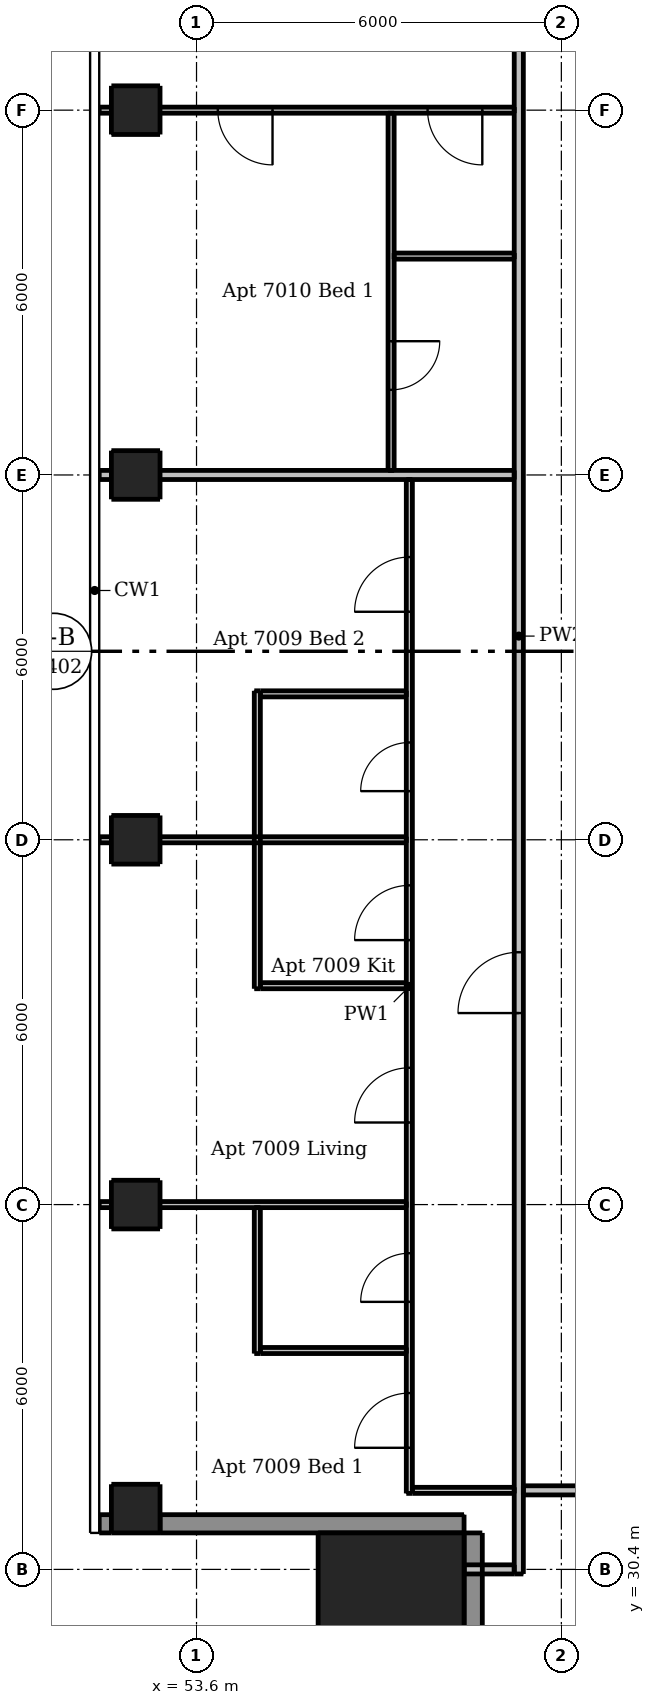
"""IFC4 building model, lengths in metres.
Left out: names, types, materials, properties, quantities, classifications, styles, units other than length and angle.
Written with IfcOpenShell. Run it as: python <this file> out.ifc"""

import sys

from ifc_helpers import new_model, si_unit, direction, frame, frame_2d, origin, origin_2d, place, context, subcontext, project, spatial, rectangle, extrude, element, fill, save


model = new_model("IFC4")
c1 = context("Model", 3, precision=1e-05, world=origin(), true_north=direction((0.0, 1.0)))
c2 = subcontext(c1, "Body", "Model", "MODEL_VIEW")
j1 = project(units=[si_unit("LENGTHUNIT", "METRE"), si_unit("PLANEANGLEUNIT", "RADIAN")], contexts=[c1])
p1 = place(None, origin())
s1 = spatial("IfcSite", under=j1, at=p1, CompositionType="ELEMENT")
p2 = place(p1, origin())
s2 = spatial("IfcBuilding", under=s1, at=p2, CompositionType="ELEMENT")
p3 = place(p2, frame((0.0, 0.0, 262.0)))
s3 = spatial("IfcBuildingStorey", under=s2, at=p3, CompositionType="ELEMENT", Elevation=262.0)
for number, where, z_axis, x_axis in (
    (1, (52.6, 31.4, 0.0), (0.0, 0.0, 1.0), (1.0, 0.0, 0.0)),
    (2, (52.6, 36.4, 0.0), (0.0, 0.0, 1.0), (1.0, 0.0, 0.0)),
    (3, (52.6, 42.4, 0.0), (0.0, 0.0, 1.0), (1.0, 0.0, 0.0)),
    (4, (52.6, 48.4, 0.0), (0.0, 0.0, 1.0), (1.0, 0.0, 0.0)),
    (5, (52.6, 54.4, 0.0), (0.0, 0.0, 1.0), (1.0, 0.0, 0.0)),
):
    element("IfcColumn", number, at=place(p3, frame(where, z_axis=z_axis, x_axis=x_axis)), inside=s3, PredefinedType="COLUMN", context=c2, shape_type="SweptSolid", body=[
        extrude(rectangle(XDim=0.8, YDim=0.8, at=origin_2d()), origin(), (0.0, 0.0, 1.0), 3.05),
    ])
p4 = place(p3, frame((56.8, 29.8, 0.0), z_axis=(0.0, 0.0, 1.0), x_axis=(1.0, 0.0, 0.0)))
e6 = element("IfcColumn", 6, at=p4, inside=s3, PredefinedType="COLUMN", context=c2, shape_type="SweptSolid", body=[
    extrude(rectangle(XDim=2.4, YDim=2.4, at=origin_2d()), origin(), (0.0, 0.0, 1.0), 3.3),
])
p5 = place(p3, frame((52.0, 31.15, 0.0), z_axis=(0.0, 0.0, 1.0), x_axis=(1.0, 0.0, 0.0)))
e7 = element("IfcWall", 7, at=p5, inside=s3, PredefinedType="SOLIDWALL", context=c2, shape_type="SweptSolid", body=[
    extrude(rectangle(XDim=0.2, YDim=0.3, at=frame_2d((0.1, 0.0))), origin(), (0.0, 0.0, 1.0), 3.05),
])
p6 = place(p3, frame((53.0, 31.15, 0.0), z_axis=(0.0, 0.0, 1.0), x_axis=(1.0, 0.0, 0.0)))
e8 = element("IfcWall", 8, at=p6, inside=s3, PredefinedType="SOLIDWALL", context=c2, shape_type="SweptSolid", body=[
    extrude(rectangle(XDim=5.0, YDim=0.3, at=frame_2d((2.5, 0.0))), origin(), (0.0, 0.0, 1.0), 3.05),
])
p7 = place(p3, frame((58.15, 31.0, 0.0), z_axis=(0.0, 0.0, 1.0), x_axis=(0.0, -1.0, 0.0)))
e9 = element("IfcWall", 9, at=p7, inside=s3, PredefinedType="SOLIDWALL", context=c2, shape_type="SweptSolid", body=[
    extrude(rectangle(XDim=6.0, YDim=0.3, at=frame_2d((3.0, 0.0))), origin(), (0.0, 0.0, 1.0), 3.05),
])
p8 = place(p7, frame((1.8, 0.0, 0.15)))
e10 = element("IfcOpeningElement", 10, at=p8, cuts=e9, PredefinedType="OPENING", context=c2, shape_type="SweptSolid", body=[
    extrude(rectangle(XDim=2.4, YDim=2.1, at=frame_2d((1.2, 1.05))), frame((0.0, 0.16, 0.0), z_axis=(0.0, -1.0, 0.0), x_axis=(1.0, 0.0, 0.0)), (0.0, 0.0, 1.0), 0.32),
])
p9 = place(p3, frame((54.6, 33.95, 0.0), z_axis=(0.0, 0.0, 1.0), x_axis=(0.0, 1.0, 0.0)))
e11 = element("IfcWall", 11, at=p9, inside=s3, PredefinedType="PARTITIONING", context=c2, shape_type="SweptSolid", body=[
    extrude(rectangle(XDim=2.4, YDim=0.1, at=frame_2d((1.2, 0.0))), origin(), (0.0, 0.0, 1.0), 3.05),
])
p10 = place(p3, frame((54.6, 39.95, 0.0), z_axis=(0.0, 0.0, 1.0), x_axis=(0.0, 1.0, 0.0)))
e12 = element("IfcWall", 12, at=p10, inside=s3, PredefinedType="PARTITIONING", context=c2, shape_type="SweptSolid", body=[
    extrude(rectangle(XDim=4.9, YDim=0.1, at=frame_2d((2.45, 0.0))), origin(), (0.0, 0.0, 1.0), 3.05),
])
p11 = place(p3, frame((56.8, 54.35, 0.0), z_axis=(0.0, 0.0, 1.0), x_axis=(0.0, -1.0, 0.0)))
e13 = element("IfcWall", 13, at=p11, inside=s3, PredefinedType="PARTITIONING", context=c2, shape_type="SweptSolid", body=[
    extrude(rectangle(XDim=5.875, YDim=0.1, at=frame_2d((2.938, 0.0))), origin(), (0.0, 0.0, 1.0), 3.05),
])
p12 = place(p11, frame((3.75, 0.0, 0.0)))
e14 = element("IfcOpeningElement", 14, at=p12, cuts=e13, PredefinedType="OPENING", context=c2, shape_type="SweptSolid", body=[
    extrude(rectangle(XDim=0.8, YDim=2.1, at=frame_2d((0.4, 1.05))), frame((0.0, 0.06, 0.0), z_axis=(0.0, -1.0, 0.0), x_axis=(1.0, 0.0, 0.0)), (0.0, 0.0, 1.0), 0.12),
])
p13 = place(p3, frame((57.1, 31.65, 0.0), z_axis=(0.0, 0.0, 1.0), x_axis=(0.0, 1.0, 0.0)))
e15 = element("IfcWall", 15, at=p13, inside=s3, PredefinedType="PARTITIONING", context=c2, shape_type="SweptSolid", body=[
    extrude(rectangle(XDim=16.675, YDim=0.1, at=frame_2d((8.337, 0.0))), origin(), (0.0, 0.0, 1.0), 3.05),
])
p14 = place(p13, frame((6.1, 0.0, 0.0)))
e16 = element("IfcOpeningElement", 16, at=p14, cuts=e15, PredefinedType="OPENING", context=c2, shape_type="SweptSolid", body=[
    extrude(rectangle(XDim=0.9, YDim=2.1, at=frame_2d((0.45, 1.05))), frame((0.0, 0.06, 0.0), z_axis=(0.0, -1.0, 0.0), x_axis=(1.0, 0.0, 0.0)), (0.0, 0.0, 1.0), 0.12),
])
p15 = place(p13, frame((9.1, 0.0, 0.0)))
e17 = element("IfcOpeningElement", 17, at=p15, cuts=e15, PredefinedType="OPENING", context=c2, shape_type="SweptSolid", body=[
    extrude(rectangle(XDim=0.9, YDim=2.1, at=frame_2d((0.45, 1.05))), frame((0.0, 0.06, 0.0), z_axis=(0.0, -1.0, 0.0), x_axis=(1.0, 0.0, 0.0)), (0.0, 0.0, 1.0), 0.12),
])
p16 = place(p13, frame((0.75, 0.0, 0.0)))
e18 = element("IfcOpeningElement", 18, at=p16, cuts=e15, PredefinedType="OPENING", context=c2, shape_type="SweptSolid", body=[
    extrude(rectangle(XDim=0.9, YDim=2.1, at=frame_2d((0.45, 1.05))), frame((0.0, 0.06, 0.0), z_axis=(0.0, -1.0, 0.0), x_axis=(1.0, 0.0, 0.0)), (0.0, 0.0, 1.0), 0.12),
])
p17 = place(p13, frame((14.5, 0.0, 0.0)))
e19 = element("IfcOpeningElement", 19, at=p17, cuts=e15, PredefinedType="OPENING", context=c2, shape_type="SweptSolid", body=[
    extrude(rectangle(XDim=0.9, YDim=2.1, at=frame_2d((0.45, 1.05))), frame((0.0, 0.06, 0.0), z_axis=(0.0, -1.0, 0.0), x_axis=(1.0, 0.0, 0.0)), (0.0, 0.0, 1.0), 0.12),
])
p18 = place(p13, frame((3.15, 0.0, 0.0)))
e20 = element("IfcOpeningElement", 20, at=p18, cuts=e15, PredefinedType="OPENING", context=c2, shape_type="SweptSolid", body=[
    extrude(rectangle(XDim=0.8, YDim=2.1, at=frame_2d((0.4, 1.05))), frame((0.0, 0.06, 0.0), z_axis=(0.0, -1.0, 0.0), x_axis=(1.0, 0.0, 0.0)), (0.0, 0.0, 1.0), 0.12),
])
p19 = place(p13, frame((11.55, 0.0, 0.0)))
e21 = element("IfcOpeningElement", 21, at=p19, cuts=e15, PredefinedType="OPENING", context=c2, shape_type="SweptSolid", body=[
    extrude(rectangle(XDim=0.8, YDim=2.1, at=frame_2d((0.4, 1.05))), frame((0.0, 0.06, 0.0), z_axis=(0.0, -1.0, 0.0), x_axis=(1.0, 0.0, 0.0)), (0.0, 0.0, 1.0), 0.12),
])
p20 = place(p3, frame((58.825, 54.4, 0.0), z_axis=(0.0, 0.0, 1.0), x_axis=(-1.0, 0.0, 0.0)))
e22 = element("IfcWall", 22, at=p20, inside=s3, PredefinedType="PARTITIONING", context=c2, shape_type="SweptSolid", body=[
    extrude(rectangle(XDim=6.825, YDim=0.1, at=frame_2d((3.413, 0.0))), origin(), (0.0, 0.0, 1.0), 2.516),
])
p21 = place(p20, frame((0.525, 0.0, 0.0)))
e23 = element("IfcOpeningElement", 23, at=p21, cuts=e22, PredefinedType="OPENING", context=c2, shape_type="SweptSolid", body=[
    extrude(rectangle(XDim=0.9, YDim=2.1, at=frame_2d((0.45, 1.05))), frame((0.0, 0.06, 0.0), z_axis=(0.0, -1.0, 0.0), x_axis=(1.0, 0.0, 0.0)), (0.0, 0.0, 1.0), 0.12),
])
p22 = place(p20, frame((3.975, 0.0, 0.0)))
e24 = element("IfcOpeningElement", 24, at=p22, cuts=e22, PredefinedType="OPENING", context=c2, shape_type="SweptSolid", body=[
    extrude(rectangle(XDim=0.9, YDim=2.1, at=frame_2d((0.45, 1.05))), frame((0.0, 0.06, 0.0), z_axis=(0.0, -1.0, 0.0), x_axis=(1.0, 0.0, 0.0)), (0.0, 0.0, 1.0), 0.12),
])
p23 = place(p3, frame((56.85, 52.0, 0.0), z_axis=(0.0, 0.0, 1.0), x_axis=(1.0, 0.0, 0.0)))
e25 = element("IfcWall", 25, at=p23, inside=s3, PredefinedType="PARTITIONING", context=c2, shape_type="SweptSolid", body=[
    extrude(rectangle(XDim=1.975, YDim=0.1, at=frame_2d((0.987, 0.0))), origin(), (0.0, 0.0, 1.0), 3.05),
])
p24 = place(p3, frame((54.65, 44.8, 0.0), z_axis=(0.0, 0.0, 1.0), x_axis=(1.0, 0.0, 0.0)))
e26 = element("IfcWall", 26, at=p24, inside=s3, PredefinedType="PARTITIONING", context=c2, shape_type="SweptSolid", body=[
    extrude(rectangle(XDim=2.4, YDim=0.1, at=frame_2d((1.2, 0.0))), origin(), (0.0, 0.0, 1.0), 3.05),
])
p25 = place(p3, frame((52.0, 42.4, 0.0), z_axis=(0.0, 0.0, 1.0), x_axis=(1.0, 0.0, 0.0)))
e27 = element("IfcWall", 27, at=p25, inside=s3, PredefinedType="PARTITIONING", context=c2, shape_type="SweptSolid", body=[
    extrude(rectangle(XDim=5.05, YDim=0.1, at=frame_2d((2.525, 0.0))), origin(), (0.0, 0.0, 1.0), 2.516),
])
p26 = place(p3, frame((54.65, 40.0, 0.0), z_axis=(0.0, 0.0, 1.0), x_axis=(1.0, 0.0, 0.0)))
e28 = element("IfcWall", 28, at=p26, inside=s3, PredefinedType="PARTITIONING", context=c2, shape_type="SweptSolid", body=[
    extrude(rectangle(XDim=2.4, YDim=0.1, at=frame_2d((1.2, 0.0))), origin(), (0.0, 0.0, 1.0), 3.05),
])
p27 = place(p3, frame((52.0, 36.4, 0.0), z_axis=(0.0, 0.0, 1.0), x_axis=(1.0, 0.0, 0.0)))
e29 = element("IfcWall", 29, at=p27, inside=s3, PredefinedType="PARTITIONING", context=c2, shape_type="SweptSolid", body=[
    extrude(rectangle(XDim=5.05, YDim=0.1, at=frame_2d((2.525, 0.0))), origin(), (0.0, 0.0, 1.0), 2.516),
])
p28 = place(p3, frame((54.65, 34.0, 0.0), z_axis=(0.0, 0.0, 1.0), x_axis=(1.0, 0.0, 0.0)))
e30 = element("IfcWall", 30, at=p28, inside=s3, PredefinedType="PARTITIONING", context=c2, shape_type="SweptSolid", body=[
    extrude(rectangle(XDim=2.4, YDim=0.1, at=frame_2d((1.2, 0.0))), origin(), (0.0, 0.0, 1.0), 3.05),
])
p29 = place(p3, frame((57.15, 31.7, 0.0), z_axis=(0.0, 0.0, 1.0), x_axis=(1.0, 0.0, 0.0)))
e31 = element("IfcWall", 31, at=p29, inside=s3, PredefinedType="PARTITIONING", context=c2, shape_type="SweptSolid", body=[
    extrude(rectangle(XDim=1.675, YDim=0.1, at=frame_2d((0.837, 0.0))), origin(), (0.0, 0.0, 1.0), 3.05),
])
p30 = place(p3, frame((58.9, 30.325, 0.0), z_axis=(0.0, 0.0, 1.0), x_axis=(0.0, 1.0, 0.0)))
e32 = element("IfcWall", 32, at=p30, inside=s3, PredefinedType="PARTITIONING", context=c2, shape_type="SweptSolid", body=[
    extrude(rectangle(XDim=30.85, YDim=0.15, at=frame_2d((15.425, 0.0))), origin(), (0.0, 0.0, 1.0), 3.05),
])
p31 = place(p30, frame((9.225, 0.0, 0.0)))
e33 = element("IfcOpeningElement", 33, at=p31, cuts=e32, PredefinedType="OPENING", context=c2, shape_type="SweptSolid", body=[
    extrude(rectangle(XDim=1.0, YDim=2.1, at=frame_2d((0.5, 1.05))), frame((0.0, 0.085, 0.0), z_axis=(0.0, -1.0, 0.0), x_axis=(1.0, 0.0, 0.0)), (0.0, 0.0, 1.0), 0.17),
])
p32 = place(p30, frame((26.925, 0.0, 0.0)))
e34 = element("IfcOpeningElement", 34, at=p32, cuts=e32, PredefinedType="OPENING", context=c2, shape_type="SweptSolid", body=[
    extrude(rectangle(XDim=1.0, YDim=2.1, at=frame_2d((0.5, 1.05))), frame((0.0, 0.085, 0.0), z_axis=(0.0, -1.0, 0.0), x_axis=(1.0, 0.0, 0.0)), (0.0, 0.0, 1.0), 0.17),
])
p33 = place(p3, frame((52.0, 48.4, 0.0), z_axis=(0.0, 0.0, 1.0), x_axis=(1.0, 0.0, 0.0)))
e35 = element("IfcWall", 35, at=p33, inside=s3, PredefinedType="PARTITIONING", context=c2, shape_type="SweptSolid", body=[
    extrude(rectangle(XDim=6.825, YDim=0.15, at=frame_2d((3.413, 0.0))), origin(), (0.0, 0.0, 1.0), 2.516),
])
p34 = place(p3, frame((89.525, 31.7, 0.0), z_axis=(0.0, 0.0, 1.0), x_axis=(-1.0, 0.0, 0.0)))
e36 = element("IfcWall", 36, at=p34, inside=s3, PredefinedType="PARTITIONING", context=c2, shape_type="SweptSolid", body=[
    extrude(rectangle(XDim=30.55, YDim=0.15, at=frame_2d((15.275, 0.0))), origin(), (0.0, 0.0, 1.0), 3.05),
])
p35 = place(p34, frame((26.775, 0.0, 0.0)))
e37 = element("IfcOpeningElement", 37, at=p35, cuts=e36, PredefinedType="OPENING", context=c2, shape_type="SweptSolid", body=[
    extrude(rectangle(XDim=1.0, YDim=2.1, at=frame_2d((0.5, 1.05))), frame((0.0, 0.085, 0.0), z_axis=(0.0, -1.0, 0.0), x_axis=(1.0, 0.0, 0.0)), (0.0, 0.0, 1.0), 0.17),
])
p36 = place(p34, frame((9.625, 0.0, 0.0)))
e38 = element("IfcOpeningElement", 38, at=p36, cuts=e36, PredefinedType="OPENING", context=c2, shape_type="SweptSolid", body=[
    extrude(rectangle(XDim=1.0, YDim=2.1, at=frame_2d((0.5, 1.05))), frame((0.0, 0.085, 0.0), z_axis=(0.0, -1.0, 0.0), x_axis=(1.0, 0.0, 0.0)), (0.0, 0.0, 1.0), 0.17),
])
p37 = place(p34, frame((2.425, 0.0, 0.0)))
e39 = element("IfcOpeningElement", 39, at=p37, cuts=e36, PredefinedType="OPENING", context=c2, shape_type="SweptSolid", body=[
    extrude(rectangle(XDim=1.0, YDim=2.1, at=frame_2d((0.5, 1.05))), frame((0.0, 0.085, 0.0), z_axis=(0.0, -1.0, 0.0), x_axis=(1.0, 0.0, 0.0)), (0.0, 0.0, 1.0), 0.17),
])
p38 = place(p3, frame((58.0, 30.4, 0.0), z_axis=(0.0, 0.0, 1.0), x_axis=(1.0, 0.0, 0.0)))
e40 = element("IfcWall", 40, at=p38, inside=s3, PredefinedType="PARTITIONING", context=c2, shape_type="SweptSolid", body=[
    extrude(rectangle(XDim=0.825, YDim=0.15, at=frame_2d((0.413, 0.0))), origin(), (0.0, 0.0, 1.0), 3.05),
])
p39 = place(p31, origin())
e41 = element("IfcDoor", 41, at=p39, inside=s3, OperationType="SINGLE_SWING_LEFT", PredefinedType="DOOR", context=c2, shape_type="SweptSolid", body=[
    extrude(rectangle(XDim=1.0, YDim=2.1, at=frame_2d((0.5, 1.05))), frame((0.0, 0.025, 0.0), z_axis=(0.0, -1.0, 0.0), x_axis=(1.0, 0.0, 0.0)), (0.0, 0.0, 1.0), 0.05),
])
fill(e33, e41)
p40 = place(p14, origin())
e42 = element("IfcDoor", 42, at=p40, inside=s3, OperationType="SINGLE_SWING_LEFT", PredefinedType="DOOR", context=c2, shape_type="SweptSolid", body=[
    extrude(rectangle(XDim=0.9, YDim=2.1, at=frame_2d((0.45, 1.05))), frame((0.0, 0.025, 0.0), z_axis=(0.0, -1.0, 0.0), x_axis=(1.0, 0.0, 0.0)), (0.0, 0.0, 1.0), 0.05),
])
fill(e16, e42)
p41 = place(p15, origin())
e43 = element("IfcDoor", 43, at=p41, inside=s3, OperationType="SINGLE_SWING_LEFT", PredefinedType="DOOR", context=c2, shape_type="SweptSolid", body=[
    extrude(rectangle(XDim=0.9, YDim=2.1, at=frame_2d((0.45, 1.05))), frame((0.0, 0.025, 0.0), z_axis=(0.0, -1.0, 0.0), x_axis=(1.0, 0.0, 0.0)), (0.0, 0.0, 1.0), 0.05),
])
fill(e17, e43)
p42 = place(p16, origin())
e44 = element("IfcDoor", 44, at=p42, inside=s3, OperationType="SINGLE_SWING_LEFT", PredefinedType="DOOR", context=c2, shape_type="SweptSolid", body=[
    extrude(rectangle(XDim=0.9, YDim=2.1, at=frame_2d((0.45, 1.05))), frame((0.0, 0.025, 0.0), z_axis=(0.0, -1.0, 0.0), x_axis=(1.0, 0.0, 0.0)), (0.0, 0.0, 1.0), 0.05),
])
fill(e18, e44)
p43 = place(p17, origin())
e45 = element("IfcDoor", 45, at=p43, inside=s3, OperationType="SINGLE_SWING_LEFT", PredefinedType="DOOR", context=c2, shape_type="SweptSolid", body=[
    extrude(rectangle(XDim=0.9, YDim=2.1, at=frame_2d((0.45, 1.05))), frame((0.0, 0.025, 0.0), z_axis=(0.0, -1.0, 0.0), x_axis=(1.0, 0.0, 0.0)), (0.0, 0.0, 1.0), 0.05),
])
fill(e19, e45)
p44 = place(p18, origin())
e46 = element("IfcDoor", 46, at=p44, inside=s3, OperationType="SINGLE_SWING_LEFT", PredefinedType="DOOR", context=c2, shape_type="SweptSolid", body=[
    extrude(rectangle(XDim=0.8, YDim=2.1, at=frame_2d((0.4, 1.05))), frame((0.0, 0.025, 0.0), z_axis=(0.0, -1.0, 0.0), x_axis=(1.0, 0.0, 0.0)), (0.0, 0.0, 1.0), 0.05),
])
fill(e20, e46)
p45 = place(p19, origin())
e47 = element("IfcDoor", 47, at=p45, inside=s3, OperationType="SINGLE_SWING_LEFT", PredefinedType="DOOR", context=c2, shape_type="SweptSolid", body=[
    extrude(rectangle(XDim=0.8, YDim=2.1, at=frame_2d((0.4, 1.05))), frame((0.0, 0.025, 0.0), z_axis=(0.0, -1.0, 0.0), x_axis=(1.0, 0.0, 0.0)), (0.0, 0.0, 1.0), 0.05),
])
fill(e21, e47)
p46 = place(p21, origin())
e48 = element("IfcDoor", 48, at=p46, inside=s3, OperationType="SINGLE_SWING_LEFT", PredefinedType="DOOR", context=c2, shape_type="SweptSolid", body=[
    extrude(rectangle(XDim=0.9, YDim=2.1, at=frame_2d((0.45, 1.05))), frame((0.0, 0.025, 0.0), z_axis=(0.0, -1.0, 0.0), x_axis=(1.0, 0.0, 0.0)), (0.0, 0.0, 1.0), 0.05),
])
fill(e23, e48)
p47 = place(p22, origin())
e49 = element("IfcDoor", 49, at=p47, inside=s3, OperationType="SINGLE_SWING_LEFT", PredefinedType="DOOR", context=c2, shape_type="SweptSolid", body=[
    extrude(rectangle(XDim=0.9, YDim=2.1, at=frame_2d((0.45, 1.05))), frame((0.0, 0.025, 0.0), z_axis=(0.0, -1.0, 0.0), x_axis=(1.0, 0.0, 0.0)), (0.0, 0.0, 1.0), 0.05),
])
fill(e24, e49)
p48 = place(p12, origin())
e50 = element("IfcDoor", 50, at=p48, inside=s3, OperationType="SINGLE_SWING_LEFT", PredefinedType="DOOR", context=c2, shape_type="SweptSolid", body=[
    extrude(rectangle(XDim=0.8, YDim=2.1, at=frame_2d((0.4, 1.05))), frame((0.0, 0.025, 0.0), z_axis=(0.0, -1.0, 0.0), x_axis=(1.0, 0.0, 0.0)), (0.0, 0.0, 1.0), 0.05),
])
fill(e14, e50)
save(model, sys.argv[1])
